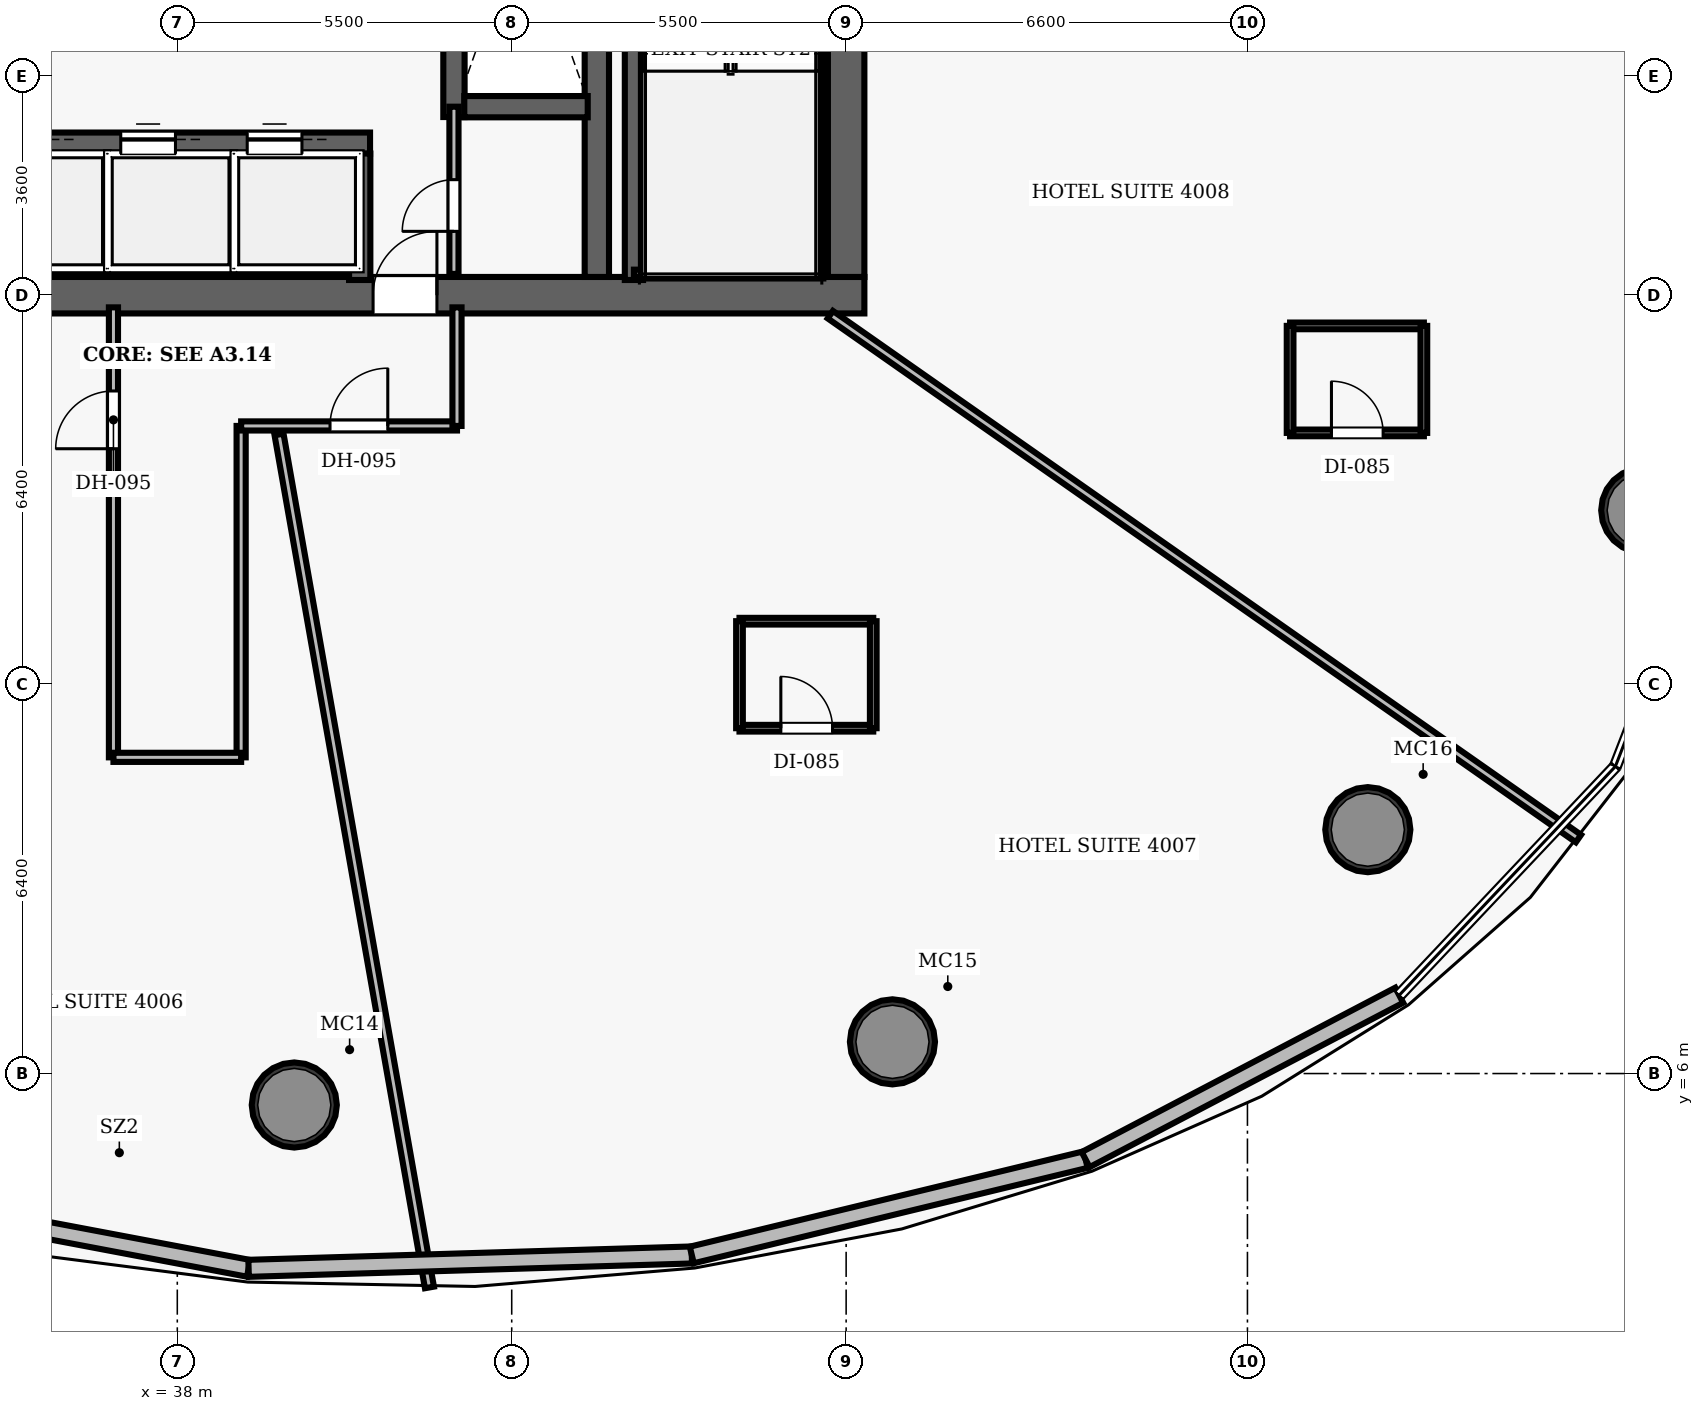
"""IFC4 building model, lengths in metres.
Left out: names, types, materials, properties, quantities, classifications, styles, units other than length and angle.
Written with IfcOpenShell. Run it as: python <this file> out.ifc"""

import sys

from ifc_helpers import new_model, si_unit, direction, frame, frame_2d, origin, origin_2d, place, context, subcontext, project, spatial, rectangle, hollow_circle, extrude, element, fill, save


model = new_model("IFC4")
c1 = context("Model", 3, precision=1e-05, world=origin(), true_north=direction((0.0, 1.0)))
c2 = subcontext(c1, "Body", "Model", "MODEL_VIEW")
j1 = project(units=[si_unit("LENGTHUNIT", "METRE"), si_unit("PLANEANGLEUNIT", "RADIAN")], contexts=[c1])
p1 = place(None, origin())
s1 = spatial("IfcSite", under=j1, at=p1, CompositionType="ELEMENT")
p2 = place(p1, origin())
s2 = spatial("IfcBuilding", under=s1, at=p2, CompositionType="ELEMENT")
p3 = place(p2, frame((0.0, 0.0, 158.8)))
s3 = spatial("IfcBuildingStorey", under=s2, at=p3, CompositionType="ELEMENT", Elevation=158.8)
p4 = place(p3, frame((26.7, 18.8, 0.0), z_axis=(0.0, 0.0, 1.0), x_axis=(1.0, 0.0, 0.0)))
e1 = element("IfcWall", 1, at=p4, inside=s3, PredefinedType="SHEAR", context=c2, shape_type="SweptSolid", body=[
    extrude(rectangle(XDim=22.6, YDim=0.6, at=frame_2d((11.3, 0.0))), origin(), (0.0, 0.0, 1.0), 3.5),
])
p5 = place(p4, frame((14.52, 0.0, 0.0)))
e2 = element("IfcOpeningElement", 2, at=p5, cuts=e1, PredefinedType="OPENING", context=c2, shape_type="SweptSolid", body=[
    extrude(rectangle(XDim=1.05, YDim=2.15, at=frame_2d((0.525, 1.075))), frame((0.0, 0.31, 0.0), z_axis=(0.0, -1.0, 0.0), x_axis=(1.0, 0.0, 0.0)), (0.0, 0.0, 1.0), 0.62),
])
p6 = place(p3, frame((49.0, 19.1, 0.0), z_axis=(0.0, 0.0, 1.0), x_axis=(0.0, 1.0, 0.0)))
e3 = element("IfcWall", 3, at=p6, inside=s3, PredefinedType="SHEAR", context=c2, shape_type="SweptSolid", body=[
    extrude(rectangle(XDim=13.8, YDim=0.6, at=frame_2d((6.9, 0.0))), origin(), (0.0, 0.0, 1.0), 3.5),
])
p7 = place(p6, frame((8.2, 0.0, 0.0)))
e4 = element("IfcOpeningElement", 4, at=p7, cuts=e3, PredefinedType="OPENING", context=c2, shape_type="SweptSolid", body=[
    extrude(rectangle(XDim=1.05, YDim=2.15, at=frame_2d((0.525, 1.075))), frame((0.0, 0.31, 0.0), z_axis=(0.0, -1.0, 0.0), x_axis=(1.0, 0.0, 0.0)), (0.0, 0.0, 1.0), 0.62),
])
p8 = place(p3, frame((44.9, 19.1, 0.0), z_axis=(0.0, 0.0, 1.0), x_axis=(0.0, 1.0, 0.0)))
e5 = element("IfcWall", 5, at=p8, inside=s3, PredefinedType="SHEAR", context=c2, shape_type="SweptSolid", body=[
    extrude(rectangle(XDim=13.8, YDim=0.4, at=frame_2d((6.9, 0.0))), origin(), (0.0, 0.0, 1.0), 3.5),
])
for number, where, z_axis, x_axis in (
    (6, (62.118, 15.262, 0.0), (0.0, 0.0, 1.0), (1.0, 0.0, 0.0)),
    (7, (39.924, 5.483, 0.0), (0.0, 0.0, 1.0), (1.0, 0.0, 0.0)),
    (8, (49.762, 6.521, 0.0), (0.0, 0.0, 1.0), (1.0, 0.0, 0.0)),
    (9, (57.58, 10.011, 0.0), (0.0, 0.0, 1.0), (1.0, 0.0, 0.0)),
):
    element("IfcColumn", number, at=place(p3, frame(where, z_axis=z_axis, x_axis=x_axis)), inside=s3, PredefinedType="COLUMN", context=c2, shape_type="SweptSolid", body=[
        extrude(hollow_circle(Radius=0.7, WallThickness=0.055, at=origin_2d()), origin(), (0.0, 0.0, 1.0), 3.5),
    ])
p9 = place(p3, frame((45.51, 19.05, 0.0), z_axis=(0.0, 0.0, 1.0), x_axis=(0.0, 1.0, 0.0)))
e10 = element("IfcWall", 10, at=p9, inside=s3, PredefinedType="SHEAR", context=c2, shape_type="SweptSolid", body=[
    extrude(rectangle(XDim=7.5, YDim=0.3, at=frame_2d((3.75, 0.0))), origin(), (0.0, 0.0, 1.0), 3.5),
])
p10 = place(p3, frame((48.605, 19.1, 0.0), z_axis=(0.0, 0.0, 1.0), x_axis=(0.0, 1.0, 0.0)))
e11 = element("IfcWall", 11, at=p10, inside=s3, PredefinedType="SHEAR", context=c2, shape_type="SweptSolid", body=[
    extrude(rectangle(XDim=7.45, YDim=0.12, at=frame_2d((3.725, 0.0))), origin(), (0.0, 0.0, 1.0), 3.5),
])
p11 = place(p3, frame((45.51, 19.16, 0.0), z_axis=(0.0, 0.0, 1.0), x_axis=(1.0, 0.0, 0.0)))
e12 = element("IfcWall", 12, at=p11, inside=s3, PredefinedType="SHEAR", context=c2, shape_type="SweptSolid", body=[
    extrude(rectangle(XDim=3.095, YDim=0.12, at=frame_2d((1.547, 0.0))), origin(), (0.0, 0.0, 1.0), 3.5),
])
p12 = place(p3, frame((42.55, 21.73, 0.0), z_axis=(0.0, 0.0, 1.0), x_axis=(0.0, 1.0, 0.0)))
e13 = element("IfcWall", 13, at=p12, inside=s3, PredefinedType="SHEAR", context=c2, shape_type="SweptSolid", body=[
    extrude(rectangle(XDim=6.54, YDim=0.35, at=frame_2d((3.27, 0.0))), origin(), (0.0, 0.0, 1.0), 2.675),
])
p13 = place(p3, frame((42.72, 21.9, 0.0), z_axis=(0.0, 0.0, 1.0), x_axis=(1.0, 0.0, 0.0)))
e14 = element("IfcWall", 14, at=p13, inside=s3, PredefinedType="SHEAR", context=c2, shape_type="SweptSolid", body=[
    extrude(rectangle(XDim=2.03, YDim=0.35, at=frame_2d((1.015, 0.0))), origin(), (0.0, 0.0, 1.0), 2.675),
])
p14 = place(p3, frame((34.49, 21.3, 0.0), z_axis=(0.0, 0.0, 1.0), x_axis=(1.0, 0.0, 0.0)))
e15 = element("IfcWall", 15, at=p14, inside=s3, PredefinedType="SHEAR", context=c2, shape_type="SweptSolid", body=[
    extrude(rectangle(XDim=6.68, YDim=0.35, at=frame_2d((3.34, 0.0))), origin(), (0.0, 0.0, 1.0), 2.675),
])
p15 = place(p14, frame((0.5, 0.0, 0.0)))
e16 = element("IfcOpeningElement", 16, at=p15, cuts=e15, PredefinedType="OPENING", context=c2, shape_type="SweptSolid", body=[
    extrude(rectangle(XDim=0.9, YDim=2.15, at=frame_2d((0.45, 1.075))), frame((0.0, 0.185, 0.0), z_axis=(0.0, -1.0, 0.0), x_axis=(1.0, 0.0, 0.0)), (0.0, 0.0, 1.0), 0.37),
])
p16 = place(p14, frame((2.58, 0.0, 0.0)))
e17 = element("IfcOpeningElement", 17, at=p16, cuts=e15, PredefinedType="OPENING", context=c2, shape_type="SweptSolid", body=[
    extrude(rectangle(XDim=0.9, YDim=2.15, at=frame_2d((0.45, 1.075))), frame((0.0, 0.185, 0.0), z_axis=(0.0, -1.0, 0.0), x_axis=(1.0, 0.0, 0.0)), (0.0, 0.0, 1.0), 0.37),
])
p17 = place(p14, frame((4.66, 0.0, 0.0)))
e18 = element("IfcOpeningElement", 18, at=p17, cuts=e15, PredefinedType="OPENING", context=c2, shape_type="SweptSolid", body=[
    extrude(rectangle(XDim=0.9, YDim=2.15, at=frame_2d((0.45, 1.075))), frame((0.0, 0.185, 0.0), z_axis=(0.0, -1.0, 0.0), x_axis=(1.0, 0.0, 0.0)), (0.0, 0.0, 1.0), 0.37),
])
p18 = place(p3, frame((41.0, 19.05, 0.0), z_axis=(0.0, 0.0, 1.0), x_axis=(0.0, 1.0, 0.0)))
e19 = element("IfcWall", 19, at=p18, inside=s3, PredefinedType="SHEAR", context=c2, shape_type="SweptSolid", body=[
    extrude(rectangle(XDim=2.08, YDim=0.35, at=frame_2d((1.04, 0.0))), origin(), (0.0, 0.0, 1.0), 2.675),
])
p19 = place(p3, frame((42.55, 19.15, 0.0), z_axis=(0.0, 0.0, 1.0), x_axis=(0.0, 1.0, 0.0)))
e20 = element("IfcWall", 20, at=p19, inside=s3, PredefinedType="PARTITIONING", context=c2, shape_type="SweptSolid", body=[
    extrude(rectangle(XDim=2.75, YDim=0.15, at=frame_2d((1.375, 0.0))), origin(), (0.0, 0.0, 1.0), 2.675),
])
p20 = place(p19, frame((0.7, 0.0, 0.0)))
e21 = element("IfcOpeningElement", 21, at=p20, cuts=e20, PredefinedType="OPENING", context=c2, shape_type="SweptSolid", body=[
    extrude(rectangle(XDim=0.85, YDim=2.1, at=frame_2d((0.425, 1.05))), frame((0.0, 0.085, 0.0), z_axis=(0.0, -1.0, 0.0), x_axis=(1.0, 0.0, 0.0)), (0.0, 0.0, 1.0), 0.17),
])
p21 = place(p3, frame((36.95, 11.2, 0.0), z_axis=(0.0, 0.0, 1.0), x_axis=(0.0, 1.0, 0.0)))
e22 = element("IfcWall", 22, at=p21, inside=s3, PredefinedType="PARTITIONING", context=c2, shape_type="SweptSolid", body=[
    extrude(rectangle(XDim=7.4, YDim=0.15, at=frame_2d((3.7, 0.0))), origin(), (0.0, 0.0, 1.0), 2.675),
])
p22 = place(p21, frame((5.075, 0.0, 0.0)))
e23 = element("IfcOpeningElement", 23, at=p22, cuts=e22, PredefinedType="OPENING", context=c2, shape_type="SweptSolid", body=[
    extrude(rectangle(XDim=0.95, YDim=2.15, at=frame_2d((0.475, 1.075))), frame((0.0, 0.085, 0.0), z_axis=(0.0, -1.0, 0.0), x_axis=(1.0, 0.0, 0.0)), (0.0, 0.0, 1.0), 0.17),
])
p23 = place(p3, frame((39.05, 11.2, 0.0), z_axis=(0.0, 0.0, 1.0), x_axis=(0.0, 1.0, 0.0)))
e24 = element("IfcWall", 24, at=p23, inside=s3, PredefinedType="PARTITIONING", context=c2, shape_type="SweptSolid", body=[
    extrude(rectangle(XDim=5.45, YDim=0.15, at=frame_2d((2.725, 0.0))), origin(), (0.0, 0.0, 1.0), 2.675),
])
p24 = place(p3, frame((39.05, 16.65, 0.0), z_axis=(0.0, 0.0, 1.0), x_axis=(1.0, 0.0, 0.0)))
e25 = element("IfcWall", 25, at=p24, inside=s3, PredefinedType="PARTITIONING", context=c2, shape_type="SweptSolid", body=[
    extrude(rectangle(XDim=3.55, YDim=0.15, at=frame_2d((1.775, 0.0))), origin(), (0.0, 0.0, 1.0), 2.675),
])
p25 = place(p24, frame((1.462, 0.0, 0.0)))
e26 = element("IfcOpeningElement", 26, at=p25, cuts=e25, PredefinedType="OPENING", context=c2, shape_type="SweptSolid", body=[
    extrude(rectangle(XDim=0.95, YDim=2.15, at=frame_2d((0.475, 1.075))), frame((0.0, 0.085, 0.0), z_axis=(0.0, -1.0, 0.0), x_axis=(1.0, 0.0, 0.0)), (0.0, 0.0, 1.0), 0.17),
])
p26 = place(p3, frame((42.6, 16.65, 0.0), z_axis=(0.0, 0.0, 1.0), x_axis=(0.0, 1.0, 0.0)))
e27 = element("IfcWall", 27, at=p26, inside=s3, PredefinedType="PARTITIONING", context=c2, shape_type="SweptSolid", body=[
    extrude(rectangle(XDim=1.95, YDim=0.15, at=frame_2d((0.975, 0.0))), origin(), (0.0, 0.0, 1.0), 2.675),
])
p27 = place(p3, frame((36.95, 11.2, 0.0), z_axis=(0.0, 0.0, 1.0), x_axis=(1.0, 0.0, 0.0)))
e28 = element("IfcWall", 28, at=p27, inside=s3, PredefinedType="PARTITIONING", context=c2, shape_type="SweptSolid", body=[
    extrude(rectangle(XDim=2.1, YDim=0.15, at=frame_2d((1.05, 0.0))), origin(), (0.0, 0.0, 1.0), 2.675),
])
p28 = place(p3, frame((39.673, 16.51, 0.0), z_axis=(0.0, 0.0, 1.0), x_axis=(0.173644531714, -0.984808395885, 0.0)))
e29 = element("IfcWall", 29, at=p28, inside=s3, PredefinedType="PARTITIONING", context=c2, shape_type="SweptSolid", body=[
    extrude(rectangle(XDim=14.244, YDim=0.15, at=frame_2d((7.122, 0.0))), origin(), (0.0, 0.0, 1.0), 2.675),
])
p29 = place(p3, frame((48.74, 18.48, 0.0), z_axis=(0.0, 0.0, 1.0), x_axis=(0.819152498756, -0.573575787305, 0.0)))
e30 = element("IfcWall", 30, at=p29, inside=s3, PredefinedType="PARTITIONING", context=c2, shape_type="SweptSolid", body=[
    extrude(rectangle(XDim=15.021, YDim=0.15, at=frame_2d((7.51, 0.0))), origin(), (0.0, 0.0, 1.0), 2.675),
])
p30 = place(p3, frame((47.246, 11.679, 0.0), z_axis=(0.0, 0.0, 1.0), x_axis=(1.0, 0.0, 0.0)))
e31 = element("IfcWall", 31, at=p30, inside=s3, PredefinedType="PARTITIONING", context=c2, shape_type="SweptSolid", body=[
    extrude(rectangle(XDim=2.2, YDim=0.11, at=frame_2d((1.1, 0.0))), origin(), (0.0, 0.0, 1.0), 2.675),
])
p31 = place(p30, frame((0.68, 0.0, 0.0)))
e32 = element("IfcOpeningElement", 32, at=p31, cuts=e31, PredefinedType="OPENING", context=c2, shape_type="SweptSolid", body=[
    extrude(rectangle(XDim=0.85, YDim=2.1, at=frame_2d((0.425, 1.05))), frame((0.0, 0.065, 0.0), z_axis=(0.0, -1.0, 0.0), x_axis=(1.0, 0.0, 0.0)), (0.0, 0.0, 1.0), 0.13),
])
p32 = place(p3, frame((47.246, 13.439, 0.0), z_axis=(0.0, 0.0, 1.0), x_axis=(1.0, 0.0, 0.0)))
e33 = element("IfcWall", 33, at=p32, inside=s3, PredefinedType="PARTITIONING", context=c2, shape_type="SweptSolid", body=[
    extrude(rectangle(XDim=2.2, YDim=0.11, at=frame_2d((1.1, 0.0))), origin(), (0.0, 0.0, 1.0), 2.675),
])
for number, where, z_axis, x_axis in (
    (34, (47.246, 11.679, 0.0), (0.0, 0.0, 1.0), (0.0, 1.0, 0.0)),
    (35, (49.446, 11.679, 0.0), (0.0, 0.0, 1.0), (0.0, 1.0, 0.0)),
):
    element("IfcWall", number, at=place(p3, frame(where, z_axis=z_axis, x_axis=x_axis)), inside=s3, PredefinedType="PARTITIONING", context=c2, shape_type="SweptSolid", body=[
        extrude(rectangle(XDim=1.76, YDim=0.11, at=frame_2d((0.88, 0.0))), origin(), (0.0, 0.0, 1.0), 2.675),
    ])
p33 = place(p3, frame((56.302, 16.535, 0.0), z_axis=(0.0, 0.0, 1.0), x_axis=(1.0, 0.0, 0.0)))
e36 = element("IfcWall", 36, at=p33, inside=s3, PredefinedType="PARTITIONING", context=c2, shape_type="SweptSolid", body=[
    extrude(rectangle(XDim=2.2, YDim=0.11, at=frame_2d((1.1, 0.0))), origin(), (0.0, 0.0, 1.0), 2.675),
])
p34 = place(p33, frame((0.68, 0.0, 0.0)))
e37 = element("IfcOpeningElement", 37, at=p34, cuts=e36, PredefinedType="OPENING", context=c2, shape_type="SweptSolid", body=[
    extrude(rectangle(XDim=0.85, YDim=2.1, at=frame_2d((0.425, 1.05))), frame((0.0, 0.065, 0.0), z_axis=(0.0, -1.0, 0.0), x_axis=(1.0, 0.0, 0.0)), (0.0, 0.0, 1.0), 0.13),
])
p35 = place(p3, frame((56.302, 18.295, 0.0), z_axis=(0.0, 0.0, 1.0), x_axis=(1.0, 0.0, 0.0)))
e38 = element("IfcWall", 38, at=p35, inside=s3, PredefinedType="PARTITIONING", context=c2, shape_type="SweptSolid", body=[
    extrude(rectangle(XDim=2.2, YDim=0.11, at=frame_2d((1.1, 0.0))), origin(), (0.0, 0.0, 1.0), 2.675),
])
for number, where, z_axis, x_axis in (
    (39, (56.302, 16.535, 0.0), (0.0, 0.0, 1.0), (0.0, 1.0, 0.0)),
    (40, (58.501, 16.535, 0.0), (0.0, 0.0, 1.0), (0.0, 1.0, 0.0)),
):
    element("IfcWall", number, at=place(p3, frame(where, z_axis=z_axis, x_axis=x_axis)), inside=s3, PredefinedType="PARTITIONING", context=c2, shape_type="SweptSolid", body=[
        extrude(rectangle(XDim=1.76, YDim=0.11, at=frame_2d((0.88, 0.0))), origin(), (0.0, 0.0, 1.0), 2.675),
    ])
p36 = place(p3, frame((39.173, 2.797, 0.0), z_axis=(0.0, 0.0, 1.0), x_axis=(-0.982615276767, 0.185653488694, 0.0)))
e41 = element("IfcWall", 41, at=p36, inside=s3, PredefinedType="SOLIDWALL", context=c2, shape_type="SweptSolid", body=[
    extrude(rectangle(XDim=7.569, YDim=0.28, at=frame_2d((3.785, 0.0))), origin(), (0.0, 0.0, 1.0), 3.26),
])
p37 = place(p3, frame((46.461, 3.016, 0.0), z_axis=(0.0, 0.0, 1.0), x_axis=(-0.999546874855, -0.030100580863, 0.0)))
e42 = element("IfcWall", 42, at=p37, inside=s3, PredefinedType="SOLIDWALL", context=c2, shape_type="SweptSolid", body=[
    extrude(rectangle(XDim=7.292, YDim=0.28, at=frame_2d((3.646, 0.0))), origin(), (0.0, 0.0, 1.0), 3.26),
])
p38 = place(p3, frame((52.939, 4.585, 0.0), z_axis=(0.0, 0.0, 1.0), x_axis=(-0.971904466819, -0.235375672864, 0.0)))
e43 = element("IfcWall", 43, at=p38, inside=s3, PredefinedType="SOLIDWALL", context=c2, shape_type="SweptSolid", body=[
    extrude(rectangle(XDim=6.665, YDim=0.28, at=frame_2d((3.333, 0.0))), origin(), (0.0, 0.0, 1.0), 3.26),
])
p39 = place(p3, frame((58.097, 7.288, 0.0), z_axis=(0.0, 0.0, 1.0), x_axis=(-0.885736319893, -0.464188724144, 0.0)))
e44 = element("IfcWall", 44, at=p39, inside=s3, PredefinedType="SOLIDWALL", context=c2, shape_type="SweptSolid", body=[
    extrude(rectangle(XDim=5.823, YDim=0.28, at=frame_2d((2.911, 0.0))), origin(), (0.0, 0.0, 1.0), 3.26),
])
p40 = place(p5, origin())
e45 = element("IfcDoor", 45, at=p40, inside=s3, OperationType="SINGLE_SWING_RIGHT", PredefinedType="DOOR", context=c2, shape_type="SweptSolid", body=[
    extrude(rectangle(XDim=1.05, YDim=2.15, at=frame_2d((0.525, 1.075))), frame((0.0, 0.025, 0.0), z_axis=(0.0, -1.0, 0.0), x_axis=(1.0, 0.0, 0.0)), (0.0, 0.0, 1.0), 0.05),
])
fill(e2, e45)
p41 = place(p20, origin())
e46 = element("IfcDoor", 46, at=p41, inside=s3, OperationType="SINGLE_SWING_LEFT", PredefinedType="DOOR", context=c2, shape_type="SweptSolid", body=[
    extrude(rectangle(XDim=0.85, YDim=2.1, at=frame_2d((0.425, 1.05))), frame((0.0, 0.025, 0.0), z_axis=(0.0, -1.0, 0.0), x_axis=(1.0, 0.0, 0.0)), (0.0, 0.0, 1.0), 0.05),
])
fill(e21, e46)
p42 = place(p22, origin())
e47 = element("IfcDoor", 47, at=p42, inside=s3, OperationType="SINGLE_SWING_LEFT", PredefinedType="DOOR", context=c2, shape_type="SweptSolid", body=[
    extrude(rectangle(XDim=0.95, YDim=2.15, at=frame_2d((0.475, 1.075))), frame((0.0, 0.025, 0.0), z_axis=(0.0, -1.0, 0.0), x_axis=(1.0, 0.0, 0.0)), (0.0, 0.0, 1.0), 0.05),
])
fill(e23, e47)
p43 = place(p25, origin())
e48 = element("IfcDoor", 48, at=p43, inside=s3, OperationType="SINGLE_SWING_RIGHT", PredefinedType="DOOR", context=c2, shape_type="SweptSolid", body=[
    extrude(rectangle(XDim=0.95, YDim=2.15, at=frame_2d((0.475, 1.075))), frame((0.0, 0.025, 0.0), z_axis=(0.0, -1.0, 0.0), x_axis=(1.0, 0.0, 0.0)), (0.0, 0.0, 1.0), 0.05),
])
fill(e26, e48)
p44 = place(p31, origin())
e49 = element("IfcDoor", 49, at=p44, inside=s3, OperationType="SINGLE_SWING_LEFT", PredefinedType="DOOR", context=c2, shape_type="SweptSolid", body=[
    extrude(rectangle(XDim=0.85, YDim=2.1, at=frame_2d((0.425, 1.05))), frame((0.0, 0.025, 0.0), z_axis=(0.0, -1.0, 0.0), x_axis=(1.0, 0.0, 0.0)), (0.0, 0.0, 1.0), 0.05),
])
fill(e32, e49)
p45 = place(p34, origin())
e50 = element("IfcDoor", 50, at=p45, inside=s3, OperationType="SINGLE_SWING_LEFT", PredefinedType="DOOR", context=c2, shape_type="SweptSolid", body=[
    extrude(rectangle(XDim=0.85, YDim=2.1, at=frame_2d((0.425, 1.05))), frame((0.0, 0.025, 0.0), z_axis=(0.0, -1.0, 0.0), x_axis=(1.0, 0.0, 0.0)), (0.0, 0.0, 1.0), 0.05),
])
fill(e37, e50)
p46 = place(p16, origin())
e51 = element("IfcDoor", 51, at=p46, inside=s3, OperationType="SLIDING_TO_LEFT", PredefinedType="DOOR", context=c2, shape_type="SweptSolid", body=[
    extrude(rectangle(XDim=0.9, YDim=2.15, at=frame_2d((0.45, 1.075))), frame((0.0, 0.025, 0.0), z_axis=(0.0, -1.0, 0.0), x_axis=(1.0, 0.0, 0.0)), (0.0, 0.0, 1.0), 0.05),
])
fill(e17, e51)
p47 = place(p17, origin())
e52 = element("IfcDoor", 52, at=p47, inside=s3, OperationType="SLIDING_TO_LEFT", PredefinedType="DOOR", context=c2, shape_type="SweptSolid", body=[
    extrude(rectangle(XDim=0.9, YDim=2.15, at=frame_2d((0.45, 1.075))), frame((0.0, 0.025, 0.0), z_axis=(0.0, -1.0, 0.0), x_axis=(1.0, 0.0, 0.0)), (0.0, 0.0, 1.0), 0.05),
])
fill(e18, e52)
save(model, sys.argv[1])
